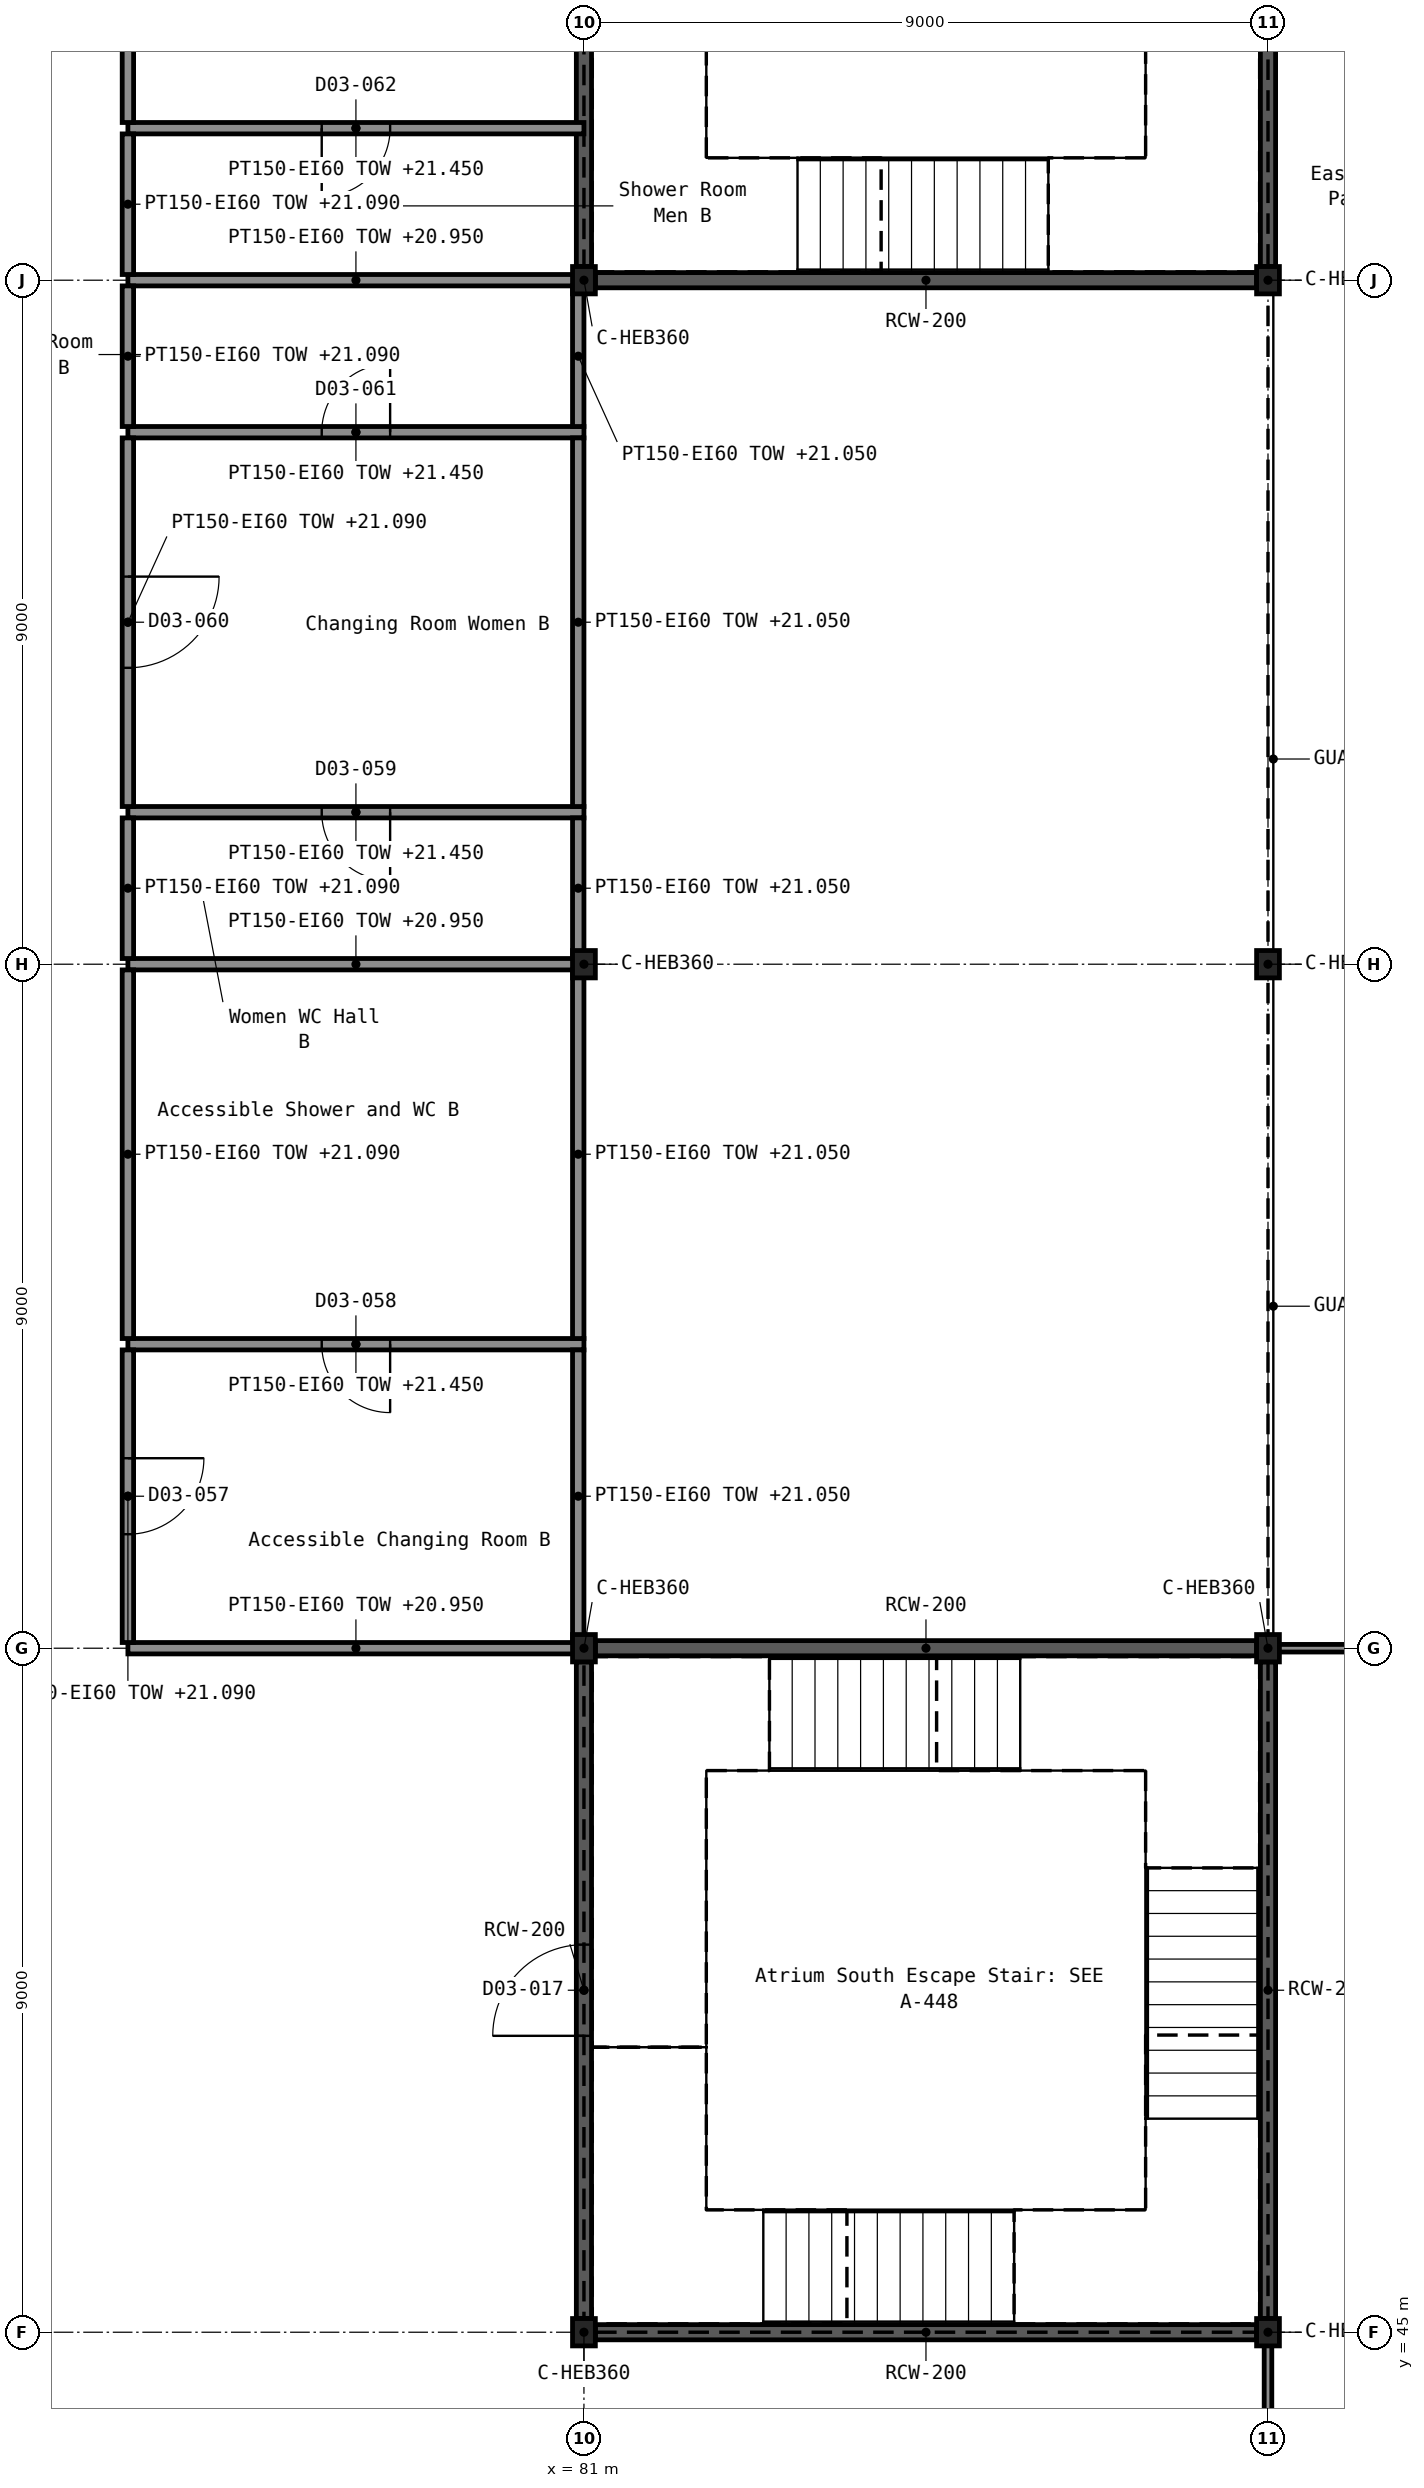
"""IFC4 building model, lengths in metres.
Left out: names, types, materials, properties, quantities, classifications, styles, units other than length and angle.
Written with IfcOpenShell. Run it as: python <this file> out.ifc"""

import sys

from ifc_helpers import new_model, si_unit, direction, frame, frame_2d, origin, origin_2d, place, context, subcontext, project, spatial, rectangle, i_section, extrude, element, fill, save


model = new_model("IFC4")
c1 = context("Model", 3, precision=1e-05, world=origin(), true_north=direction((0.0, 1.0)))
c2 = subcontext(c1, "Body", "Model", "MODEL_VIEW")
j1 = project(units=[si_unit("LENGTHUNIT", "METRE"), si_unit("PLANEANGLEUNIT", "RADIAN")], contexts=[c1])
p1 = place(None, origin())
s1 = spatial("IfcSite", under=j1, at=p1, CompositionType="ELEMENT")
p2 = place(p1, origin())
s2 = spatial("IfcBuilding", under=s1, at=p2, CompositionType="ELEMENT")
p3 = place(p2, frame((0.0, 0.0, 16.2)))
s3 = spatial("IfcBuildingStorey", under=s2, at=p3, CompositionType="ELEMENT", Elevation=16.2)
for number, where, z_axis, x_axis in (
    (1, (81.0, 45.0, 0.0), (0.0, 0.0, 1.0), (1.0, 0.0, 0.0)),
    (2, (90.0, 45.0, 0.0), (0.0, 0.0, 1.0), (1.0, 0.0, 0.0)),
    (3, (81.0, 54.0, 0.0), (0.0, 0.0, 1.0), (1.0, 0.0, 0.0)),
    (4, (90.0, 54.0, 0.0), (0.0, 0.0, 1.0), (1.0, 0.0, 0.0)),
    (5, (81.0, 63.0, 0.0), (0.0, 0.0, 1.0), (1.0, 0.0, 0.0)),
    (6, (90.0, 63.0, 0.0), (0.0, 0.0, 1.0), (1.0, 0.0, 0.0)),
    (7, (81.0, 72.0, 0.0), (0.0, 0.0, 1.0), (1.0, 0.0, 0.0)),
    (8, (90.0, 72.0, 0.0), (0.0, 0.0, 1.0), (1.0, 0.0, 0.0)),
):
    element("IfcColumn", number, at=place(p3, frame(where, z_axis=z_axis, x_axis=x_axis)), inside=s3, PredefinedType="COLUMN", context=c2, shape_type="SweptSolid", body=[
        extrude(i_section(OverallWidth=0.3, OverallDepth=0.36, WebThickness=0.012, FlangeThickness=0.022, FilletRadius=0.027, at=origin_2d()), origin(), (0.0, 0.0, 1.0), 5.4),
    ])
for number, where, z_axis, x_axis in (
    (9, (81.15, 45.0, 0.0), (0.0, 0.0, 1.0), (1.0, 0.0, 0.0)),
    (10, (81.15, 54.0, 0.0), (0.0, 0.0, 1.0), (1.0, 0.0, 0.0)),
):
    element("IfcWall", number, at=place(p3, frame(where, z_axis=z_axis, x_axis=x_axis)), inside=s3, PredefinedType="SHEAR", context=c2, shape_type="SweptSolid", body=[
        extrude(rectangle(XDim=8.7, YDim=0.2, at=frame_2d((4.35, 0.0))), origin(), (0.0, 0.0, 1.0), 5.4),
    ])
p4 = place(p3, frame((81.0, 45.18, 0.0), z_axis=(0.0, 0.0, 1.0), x_axis=(0.0, 1.0, 0.0)))
e11 = element("IfcWall", 11, at=p4, inside=s3, PredefinedType="SHEAR", context=c2, shape_type="SweptSolid", body=[
    extrude(rectangle(XDim=8.64, YDim=0.2, at=frame_2d((4.32, 0.0))), origin(), (0.0, 0.0, 1.0), 5.4),
])
p5 = place(p4, frame((3.72, 0.0, 0.0)))
e12 = element("IfcOpeningElement", 12, at=p5, cuts=e11, PredefinedType="OPENING", context=c2, shape_type="SweptSolid", body=[
    extrude(rectangle(XDim=1.2, YDim=2.1, at=frame_2d((0.6, 1.05))), frame((0.0, 0.111, 0.0), z_axis=(0.0, -1.0, 0.0), x_axis=(1.0, 0.0, 0.0)), (0.0, 0.0, 1.0), 0.222),
])
p6 = place(p3, frame((90.0, 45.18, 0.0), z_axis=(0.0, 0.0, 1.0), x_axis=(0.0, 1.0, 0.0)))
e13 = element("IfcWall", 13, at=p6, inside=s3, PredefinedType="SHEAR", context=c2, shape_type="SweptSolid", body=[
    extrude(rectangle(XDim=8.64, YDim=0.2, at=frame_2d((4.32, 0.0))), origin(), (0.0, 0.0, 1.0), 5.4),
])
p7 = place(p3, frame((81.15, 72.0, 0.0), z_axis=(0.0, 0.0, 1.0), x_axis=(1.0, 0.0, 0.0)))
e14 = element("IfcWall", 14, at=p7, inside=s3, PredefinedType="SHEAR", context=c2, shape_type="SweptSolid", body=[
    extrude(rectangle(XDim=8.7, YDim=0.2, at=frame_2d((4.35, 0.0))), origin(), (0.0, 0.0, 1.0), 5.4),
])
for number, where, z_axis, x_axis in (
    (15, (81.0, 72.18, 0.0), (0.0, 0.0, 1.0), (0.0, 1.0, 0.0)),
    (16, (90.0, 72.18, 0.0), (0.0, 0.0, 1.0), (0.0, 1.0, 0.0)),
):
    element("IfcWall", number, at=place(p3, frame(where, z_axis=z_axis, x_axis=x_axis)), inside=s3, PredefinedType="SHEAR", context=c2, shape_type="SweptSolid", body=[
        extrude(rectangle(XDim=8.64, YDim=0.2, at=frame_2d((4.32, 0.0))), origin(), (0.0, 0.0, 1.0), 5.4),
    ])
p8 = place(p3, frame((75.0, 54.0, 0.0), z_axis=(0.0, 0.0, 1.0), x_axis=(1.0, 0.0, 0.0)))
e17 = element("IfcWall", 17, at=p8, inside=s3, PredefinedType="PARTITIONING", context=c2, shape_type="SweptSolid", body=[
    extrude(rectangle(XDim=6.0, YDim=0.15, at=frame_2d((3.0, 0.0))), origin(), (0.0, 0.0, 1.0), 4.75),
])
p9 = place(p3, frame((75.0, 58.0, 0.0), z_axis=(0.0, 0.0, 1.0), x_axis=(1.0, 0.0, 0.0)))
e18 = element("IfcWall", 18, at=p9, inside=s3, PredefinedType="PARTITIONING", context=c2, shape_type="SweptSolid", body=[
    extrude(rectangle(XDim=6.0, YDim=0.15, at=frame_2d((3.0, 0.0))), origin(), (0.0, 0.0, 1.0), 5.25),
])
p10 = place(p9, frame((2.55, 0.0, 0.0)))
e19 = element("IfcOpeningElement", 19, at=p10, cuts=e18, PredefinedType="OPENING", context=c2, shape_type="SweptSolid", body=[
    extrude(rectangle(XDim=0.9, YDim=2.1, at=frame_2d((0.45, 1.05))), frame((0.0, 0.086, 0.0), z_axis=(0.0, -1.0, 0.0), x_axis=(1.0, 0.0, 0.0)), (0.0, 0.0, 1.0), 0.172),
])
p11 = place(p3, frame((75.0, 63.0, 0.0), z_axis=(0.0, 0.0, 1.0), x_axis=(1.0, 0.0, 0.0)))
e20 = element("IfcWall", 20, at=p11, inside=s3, PredefinedType="PARTITIONING", context=c2, shape_type="SweptSolid", body=[
    extrude(rectangle(XDim=6.0, YDim=0.15, at=frame_2d((3.0, 0.0))), origin(), (0.0, 0.0, 1.0), 4.75),
])
p12 = place(p3, frame((75.0, 65.0, 0.0), z_axis=(0.0, 0.0, 1.0), x_axis=(1.0, 0.0, 0.0)))
e21 = element("IfcWall", 21, at=p12, inside=s3, PredefinedType="PARTITIONING", context=c2, shape_type="SweptSolid", body=[
    extrude(rectangle(XDim=6.0, YDim=0.15, at=frame_2d((3.0, 0.0))), origin(), (0.0, 0.0, 1.0), 5.25),
])
p13 = place(p12, frame((2.55, 0.0, 0.0)))
e22 = element("IfcOpeningElement", 22, at=p13, cuts=e21, PredefinedType="OPENING", context=c2, shape_type="SweptSolid", body=[
    extrude(rectangle(XDim=0.9, YDim=2.1, at=frame_2d((0.45, 1.05))), frame((0.0, 0.086, 0.0), z_axis=(0.0, -1.0, 0.0), x_axis=(1.0, 0.0, 0.0)), (0.0, 0.0, 1.0), 0.172),
])
p14 = place(p3, frame((75.0, 70.0, 0.0), z_axis=(0.0, 0.0, 1.0), x_axis=(1.0, 0.0, 0.0)))
e23 = element("IfcWall", 23, at=p14, inside=s3, PredefinedType="PARTITIONING", context=c2, shape_type="SweptSolid", body=[
    extrude(rectangle(XDim=6.0, YDim=0.15, at=frame_2d((3.0, 0.0))), origin(), (0.0, 0.0, 1.0), 5.25),
])
p15 = place(p14, frame((2.55, 0.0, 0.0)))
e24 = element("IfcOpeningElement", 24, at=p15, cuts=e23, PredefinedType="OPENING", context=c2, shape_type="SweptSolid", body=[
    extrude(rectangle(XDim=0.9, YDim=2.1, at=frame_2d((0.45, 1.05))), frame((0.0, 0.086, 0.0), z_axis=(0.0, -1.0, 0.0), x_axis=(1.0, 0.0, 0.0)), (0.0, 0.0, 1.0), 0.172),
])
p16 = place(p3, frame((75.0, 72.0, 0.0), z_axis=(0.0, 0.0, 1.0), x_axis=(1.0, 0.0, 0.0)))
e25 = element("IfcWall", 25, at=p16, inside=s3, PredefinedType="PARTITIONING", context=c2, shape_type="SweptSolid", body=[
    extrude(rectangle(XDim=6.0, YDim=0.15, at=frame_2d((3.0, 0.0))), origin(), (0.0, 0.0, 1.0), 4.75),
])
p17 = place(p3, frame((75.0, 74.0, 0.0), z_axis=(0.0, 0.0, 1.0), x_axis=(1.0, 0.0, 0.0)))
e26 = element("IfcWall", 26, at=p17, inside=s3, PredefinedType="PARTITIONING", context=c2, shape_type="SweptSolid", body=[
    extrude(rectangle(XDim=6.0, YDim=0.15, at=frame_2d((3.0, 0.0))), origin(), (0.0, 0.0, 1.0), 5.25),
])
p18 = place(p17, frame((2.55, 0.0, 0.0)))
e27 = element("IfcOpeningElement", 27, at=p18, cuts=e26, PredefinedType="OPENING", context=c2, shape_type="SweptSolid", body=[
    extrude(rectangle(XDim=0.9, YDim=2.1, at=frame_2d((0.45, 1.05))), frame((0.0, 0.086, 0.0), z_axis=(0.0, -1.0, 0.0), x_axis=(1.0, 0.0, 0.0)), (0.0, 0.0, 1.0), 0.172),
])
p19 = place(p3, frame((75.0, 54.075, 0.0), z_axis=(0.0, 0.0, 1.0), x_axis=(0.0, 1.0, 0.0)))
e28 = element("IfcWall", 28, at=p19, inside=s3, PredefinedType="PARTITIONING", context=c2, shape_type="SweptSolid", body=[
    extrude(rectangle(XDim=3.85, YDim=0.15, at=frame_2d((1.925, 0.0))), origin(), (0.0, 0.0, 1.0), 4.89),
])
p20 = place(p19, frame((1.425, 0.0, 0.0)))
e29 = element("IfcOpeningElement", 29, at=p20, cuts=e28, PredefinedType="OPENING", context=c2, shape_type="SweptSolid", body=[
    extrude(rectangle(XDim=1.0, YDim=2.1, at=frame_2d((0.5, 1.05))), frame((0.0, 0.086, 0.0), z_axis=(0.0, -1.0, 0.0), x_axis=(1.0, 0.0, 0.0)), (0.0, 0.0, 1.0), 0.172),
])
p21 = place(p3, frame((75.0, 58.075, 0.0), z_axis=(0.0, 0.0, 1.0), x_axis=(0.0, 1.0, 0.0)))
e30 = element("IfcWall", 30, at=p21, inside=s3, PredefinedType="PARTITIONING", context=c2, shape_type="SweptSolid", body=[
    extrude(rectangle(XDim=4.85, YDim=0.15, at=frame_2d((2.425, 0.0))), origin(), (0.0, 0.0, 1.0), 4.89),
])
p22 = place(p3, frame((75.0, 63.075, 0.0), z_axis=(0.0, 0.0, 1.0), x_axis=(0.0, 1.0, 0.0)))
e31 = element("IfcWall", 31, at=p22, inside=s3, PredefinedType="PARTITIONING", context=c2, shape_type="SweptSolid", body=[
    extrude(rectangle(XDim=1.85, YDim=0.15, at=frame_2d((0.925, 0.0))), origin(), (0.0, 0.0, 1.0), 4.89),
])
p23 = place(p3, frame((75.0, 65.075, 0.0), z_axis=(0.0, 0.0, 1.0), x_axis=(0.0, 1.0, 0.0)))
e32 = element("IfcWall", 32, at=p23, inside=s3, PredefinedType="PARTITIONING", context=c2, shape_type="SweptSolid", body=[
    extrude(rectangle(XDim=4.85, YDim=0.15, at=frame_2d((2.425, 0.0))), origin(), (0.0, 0.0, 1.0), 4.89),
])
p24 = place(p23, frame((1.825, 0.0, 0.0)))
e33 = element("IfcOpeningElement", 33, at=p24, cuts=e32, PredefinedType="OPENING", context=c2, shape_type="SweptSolid", body=[
    extrude(rectangle(XDim=1.2, YDim=2.1, at=frame_2d((0.6, 1.05))), frame((0.0, 0.086, 0.0), z_axis=(0.0, -1.0, 0.0), x_axis=(1.0, 0.0, 0.0)), (0.0, 0.0, 1.0), 0.172),
])
for number, where, z_axis, x_axis in (
    (34, (75.0, 70.075, 0.0), (0.0, 0.0, 1.0), (0.0, 1.0, 0.0)),
    (35, (75.0, 72.075, 0.0), (0.0, 0.0, 1.0), (0.0, 1.0, 0.0)),
):
    element("IfcWall", number, at=place(p3, frame(where, z_axis=z_axis, x_axis=x_axis)), inside=s3, PredefinedType="PARTITIONING", context=c2, shape_type="SweptSolid", body=[
        extrude(rectangle(XDim=1.85, YDim=0.15, at=frame_2d((0.925, 0.0))), origin(), (0.0, 0.0, 1.0), 4.89),
    ])
p25 = place(p3, frame((75.0, 74.075, 0.0), z_axis=(0.0, 0.0, 1.0), x_axis=(0.0, 1.0, 0.0)))
e36 = element("IfcWall", 36, at=p25, inside=s3, PredefinedType="PARTITIONING", context=c2, shape_type="SweptSolid", body=[
    extrude(rectangle(XDim=4.85, YDim=0.15, at=frame_2d((2.425, 0.0))), origin(), (0.0, 0.0, 1.0), 4.89),
])
p26 = place(p25, frame((1.825, 0.0, 0.0)))
e37 = element("IfcOpeningElement", 37, at=p26, cuts=e36, PredefinedType="OPENING", context=c2, shape_type="SweptSolid", body=[
    extrude(rectangle(XDim=1.2, YDim=2.1, at=frame_2d((0.6, 1.05))), frame((0.0, 0.086, 0.0), z_axis=(0.0, -1.0, 0.0), x_axis=(1.0, 0.0, 0.0)), (0.0, 0.0, 1.0), 0.172),
])
p27 = place(p3, frame((80.925, 54.075, 0.0), z_axis=(0.0, 0.0, 1.0), x_axis=(0.0, 1.0, 0.0)))
e38 = element("IfcWall", 38, at=p27, inside=s3, PredefinedType="PARTITIONING", context=c2, shape_type="SweptSolid", body=[
    extrude(rectangle(XDim=3.85, YDim=0.15, at=frame_2d((1.925, 0.0))), origin(), (0.0, 0.0, 1.0), 4.85),
])
p28 = place(p3, frame((80.925, 58.075, 0.0), z_axis=(0.0, 0.0, 1.0), x_axis=(0.0, 1.0, 0.0)))
e39 = element("IfcWall", 39, at=p28, inside=s3, PredefinedType="PARTITIONING", context=c2, shape_type="SweptSolid", body=[
    extrude(rectangle(XDim=4.85, YDim=0.15, at=frame_2d((2.425, 0.0))), origin(), (0.0, 0.0, 1.0), 4.85),
])
p29 = place(p3, frame((80.925, 63.075, 0.0), z_axis=(0.0, 0.0, 1.0), x_axis=(0.0, 1.0, 0.0)))
e40 = element("IfcWall", 40, at=p29, inside=s3, PredefinedType="PARTITIONING", context=c2, shape_type="SweptSolid", body=[
    extrude(rectangle(XDim=1.85, YDim=0.15, at=frame_2d((0.925, 0.0))), origin(), (0.0, 0.0, 1.0), 4.85),
])
p30 = place(p3, frame((80.925, 65.075, 0.0), z_axis=(0.0, 0.0, 1.0), x_axis=(0.0, 1.0, 0.0)))
e41 = element("IfcWall", 41, at=p30, inside=s3, PredefinedType="PARTITIONING", context=c2, shape_type="SweptSolid", body=[
    extrude(rectangle(XDim=4.85, YDim=0.15, at=frame_2d((2.425, 0.0))), origin(), (0.0, 0.0, 1.0), 4.85),
])
p31 = place(p3, frame((80.925, 70.075, 0.0), z_axis=(0.0, 0.0, 1.0), x_axis=(0.0, 1.0, 0.0)))
e42 = element("IfcWall", 42, at=p31, inside=s3, PredefinedType="PARTITIONING", context=c2, shape_type="SweptSolid", body=[
    extrude(rectangle(XDim=1.85, YDim=0.15, at=frame_2d((0.925, 0.0))), origin(), (0.0, 0.0, 1.0), 4.85),
])
p32 = place(p3, frame((90.0, 54.0, 0.0), z_axis=(0.0, 0.0, 1.0), x_axis=(1.0, 0.0, 0.0)))
e43 = element("IfcWall", 43, at=p32, inside=s3, PredefinedType="PARTITIONING", context=c2, shape_type="SweptSolid", body=[
    extrude(rectangle(XDim=5.4, YDim=0.1, at=frame_2d((2.7, 0.0))), origin(), (0.0, 0.0, 1.0), 4.75),
])
p33 = place(p3, frame((90.0, 36.0, 0.0), z_axis=(0.0, 0.0, 1.0), x_axis=(0.0, 1.0, 0.0)))
e44 = element("IfcWall", 44, at=p33, inside=s3, PredefinedType="PARTITIONING", context=c2, shape_type="SweptSolid", body=[
    extrude(rectangle(XDim=9.0, YDim=0.1, at=frame_2d((4.5, 0.0))), origin(), (0.0, 0.0, 1.0), 4.85),
])
p34 = place(p33, frame((3.6, 0.0, 0.0)))
e45 = element("IfcOpeningElement", 45, at=p34, cuts=e44, PredefinedType="OPENING", context=c2, shape_type="SweptSolid", body=[
    extrude(rectangle(XDim=1.8, YDim=2.1, at=frame_2d((0.9, 1.05))), frame((0.0, 0.061, 0.0), z_axis=(0.0, -1.0, 0.0), x_axis=(1.0, 0.0, 0.0)), (0.0, 0.0, 1.0), 0.122),
])
p35 = place(p5, origin())
e46 = element("IfcDoor", 46, at=p35, inside=s3, OperationType="SINGLE_SWING_LEFT", PredefinedType="DOOR", context=c2, shape_type="SweptSolid", body=[
    extrude(rectangle(XDim=1.2, YDim=2.1, at=frame_2d((0.6, 1.05))), frame((0.0, 0.025, 0.0), z_axis=(0.0, -1.0, 0.0), x_axis=(1.0, 0.0, 0.0)), (0.0, 0.0, 1.0), 0.05),
])
fill(e12, e46)
p36 = place(p20, frame((1.0, 0.0, 0.0), z_axis=(0.0, 0.0, 1.0), x_axis=(-1.0, 0.0, 0.0)))
e47 = element("IfcDoor", 47, at=p36, inside=s3, OperationType="SINGLE_SWING_LEFT", PredefinedType="DOOR", context=c2, shape_type="SweptSolid", body=[
    extrude(rectangle(XDim=1.0, YDim=2.1, at=frame_2d((0.5, 1.05))), frame((0.0, 0.025, 0.0), z_axis=(0.0, -1.0, 0.0), x_axis=(1.0, 0.0, 0.0)), (0.0, 0.0, 1.0), 0.05),
])
fill(e29, e47)
p37 = place(p10, frame((0.9, 0.0, 0.0), z_axis=(0.0, 0.0, 1.0), x_axis=(-1.0, 0.0, 0.0)))
e48 = element("IfcDoor", 48, at=p37, inside=s3, OperationType="SINGLE_SWING_LEFT", PredefinedType="DOOR", context=c2, shape_type="SweptSolid", body=[
    extrude(rectangle(XDim=0.9, YDim=2.1, at=frame_2d((0.45, 1.05))), frame((0.0, 0.025, 0.0), z_axis=(0.0, -1.0, 0.0), x_axis=(1.0, 0.0, 0.0)), (0.0, 0.0, 1.0), 0.05),
])
fill(e19, e48)
p38 = place(p13, frame((0.9, 0.0, 0.0), z_axis=(0.0, 0.0, 1.0), x_axis=(-1.0, 0.0, 0.0)))
e49 = element("IfcDoor", 49, at=p38, inside=s3, OperationType="SINGLE_SWING_LEFT", PredefinedType="DOOR", context=c2, shape_type="SweptSolid", body=[
    extrude(rectangle(XDim=0.9, YDim=2.1, at=frame_2d((0.45, 1.05))), frame((0.0, 0.025, 0.0), z_axis=(0.0, -1.0, 0.0), x_axis=(1.0, 0.0, 0.0)), (0.0, 0.0, 1.0), 0.05),
])
fill(e22, e49)
p39 = place(p24, frame((1.2, 0.0, 0.0), z_axis=(0.0, 0.0, 1.0), x_axis=(-1.0, 0.0, 0.0)))
e50 = element("IfcDoor", 50, at=p39, inside=s3, OperationType="SINGLE_SWING_LEFT", PredefinedType="DOOR", context=c2, shape_type="SweptSolid", body=[
    extrude(rectangle(XDim=1.2, YDim=2.1, at=frame_2d((0.6, 1.05))), frame((0.0, 0.025, 0.0), z_axis=(0.0, -1.0, 0.0), x_axis=(1.0, 0.0, 0.0)), (0.0, 0.0, 1.0), 0.05),
])
fill(e33, e50)
p40 = place(p15, origin())
e51 = element("IfcDoor", 51, at=p40, inside=s3, OperationType="SINGLE_SWING_RIGHT", PredefinedType="DOOR", context=c2, shape_type="SweptSolid", body=[
    extrude(rectangle(XDim=0.9, YDim=2.1, at=frame_2d((0.45, 1.05))), frame((0.0, 0.025, 0.0), z_axis=(0.0, -1.0, 0.0), x_axis=(1.0, 0.0, 0.0)), (0.0, 0.0, 1.0), 0.05),
])
fill(e24, e51)
p41 = place(p18, frame((0.9, 0.0, 0.0), z_axis=(0.0, 0.0, 1.0), x_axis=(-1.0, 0.0, 0.0)))
e52 = element("IfcDoor", 52, at=p41, inside=s3, OperationType="SINGLE_SWING_RIGHT", PredefinedType="DOOR", context=c2, shape_type="SweptSolid", body=[
    extrude(rectangle(XDim=0.9, YDim=2.1, at=frame_2d((0.45, 1.05))), frame((0.0, 0.025, 0.0), z_axis=(0.0, -1.0, 0.0), x_axis=(1.0, 0.0, 0.0)), (0.0, 0.0, 1.0), 0.05),
])
fill(e27, e52)
save(model, sys.argv[1])
